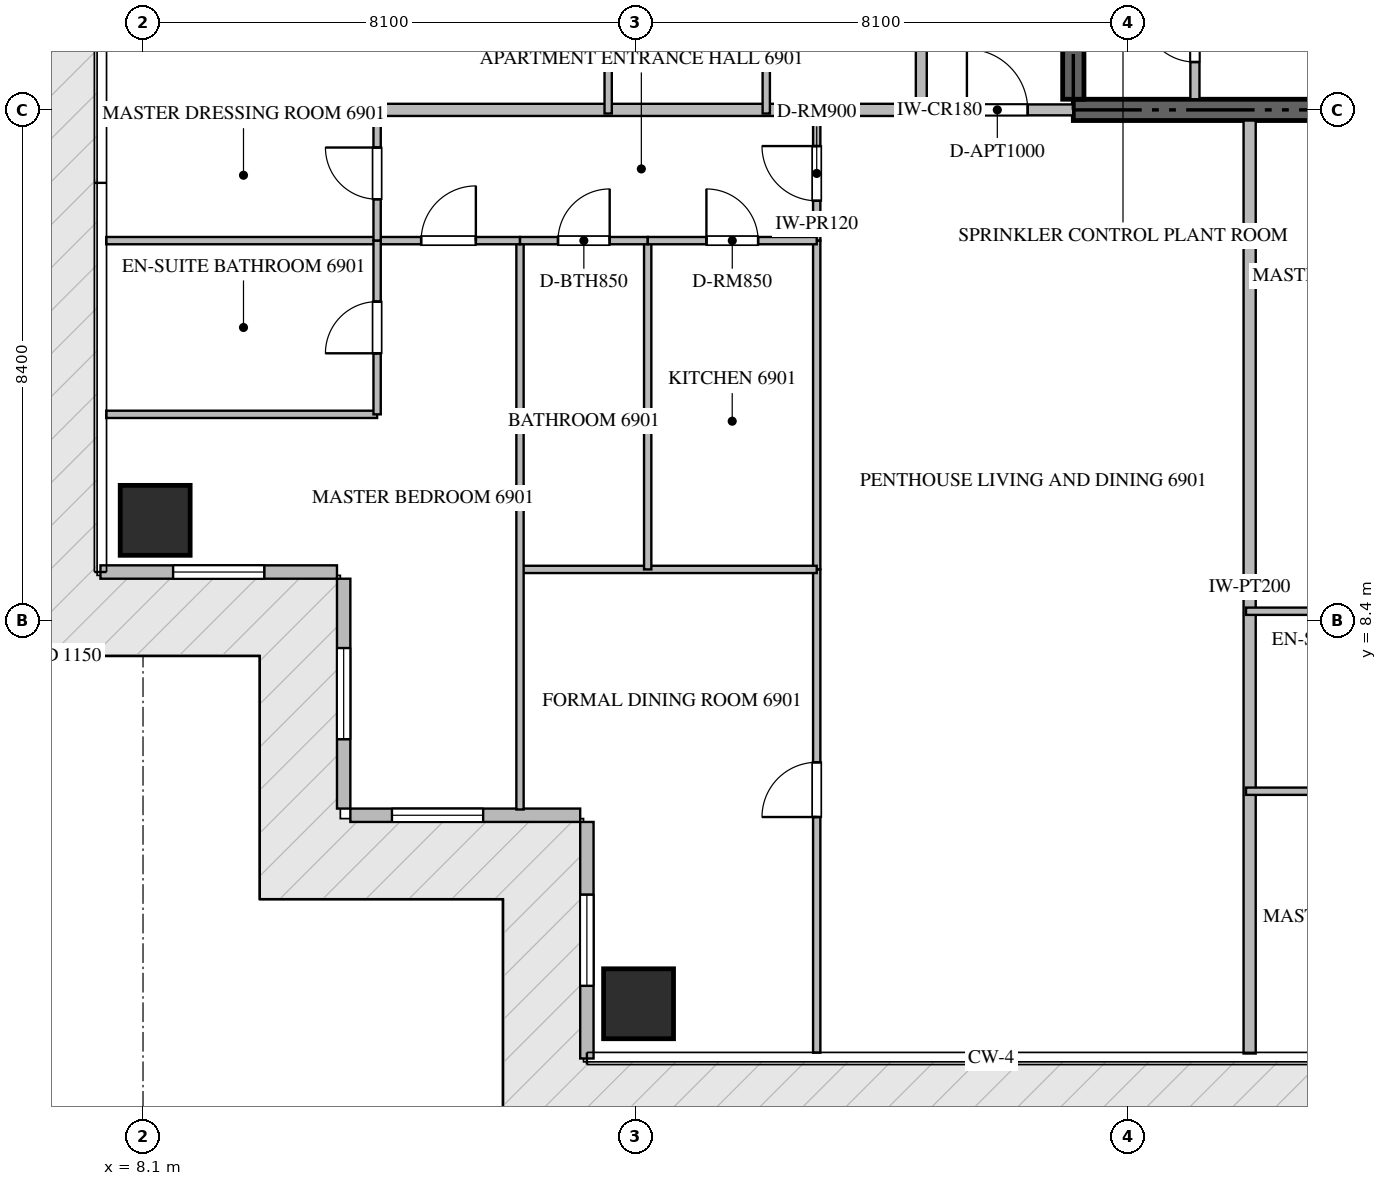
"""IFC4 building model, lengths in metres.
Left out: names, types, materials, properties, quantities, classifications, styles, units other than length and angle.
Written with IfcOpenShell. Run it as: python <this file> out.ifc"""

import sys

from ifc_helpers import new_model, si_unit, direction, frame, frame_2d, origin, origin_2d, place, context, subcontext, project, spatial, rectangle, extrude, source, transform, mapped, element, fill, save


model = new_model("IFC4")
c1 = context("Model", 3, precision=1e-05, world=origin(), true_north=direction((0.0, 1.0)))
c2 = subcontext(c1, "Body", "Model", "MODEL_VIEW")
j1 = project(units=[si_unit("LENGTHUNIT", "METRE"), si_unit("PLANEANGLEUNIT", "RADIAN")], contexts=[c1])
p1 = place(None, origin())
s1 = spatial("IfcSite", under=j1, at=p1, CompositionType="ELEMENT")
p2 = place(p1, origin())
s2 = spatial("IfcBuilding", under=s1, at=p2, CompositionType="ELEMENT")
p3 = place(p2, frame((0.0, 0.0, 275.9)))
s3 = spatial("IfcBuildingStorey", under=s2, at=p3, CompositionType="ELEMENT", Elevation=275.9)
p4 = place(p3, frame((23.4, 16.8, -0.26), z_axis=(0.0, 0.0, 1.0), x_axis=(1.0, 0.0, 0.0)))
e1 = element("IfcWall", 1, at=p4, inside=s3, PredefinedType="SHEAR", context=c2, shape_type="SweptSolid", body=[
    extrude(rectangle(XDim=18.0, YDim=0.35, at=frame_2d((9.0, 0.0))), origin(), (0.0, 0.0, 1.0), 3.848),
])
p5 = place(p3, frame((23.4, 16.975, -0.26), z_axis=(0.0, 0.0, 1.0), x_axis=(0.0, 1.0, 0.0)))
e2 = element("IfcWall", 2, at=p5, inside=s3, PredefinedType="SHEAR", context=c2, shape_type="SweptSolid", body=[
    extrude(rectangle(XDim=4.875, YDim=0.35, at=frame_2d((2.438, 0.0))), origin(), (0.0, 0.0, 1.0), 3.848),
])
m1 = source(origin(), c2, "Body", "SweptSolid", [
    extrude(rectangle(XDim=1.15, YDim=1.15, at=origin_2d()), origin(), (0.0, 0.0, 1.0), 3.85),
])
for number, where, z_axis, x_axis in (
    (3, (16.25, 2.1, -0.26), (0.0, 0.0, 1.0), (1.0, 0.0, 0.0)),
    (4, (8.3, 10.05, -0.26), (0.0, 0.0, 1.0), (1.0, 0.0, 0.0)),
):
    element("IfcColumn", number, at=place(p3, frame(where, z_axis=z_axis, x_axis=x_axis)), inside=s3, PredefinedType="COLUMN", context=c2, shape_type="MappedRepresentation", body=[
        mapped(m1, transform((0.0, 0.0, 0.0), scale=1.0)),
    ])
p6 = place(p3, frame((7.4, 9.2, 0.0), z_axis=(0.0, 0.0, 1.0), x_axis=(1.0, 0.0, 0.0)))
e5 = element("IfcWall", 5, at=p6, inside=s3, PredefinedType="ELEMENTEDWALL", context=c2, shape_type="SweptSolid", body=[
    extrude(rectangle(XDim=3.89, YDim=0.22, at=frame_2d((1.945, 0.0))), origin(), (0.0, 0.0, 1.0), 3.575),
])
p7 = place(p6, frame((1.195, 0.0, 0.65)))
e6 = element("IfcOpeningElement", 6, at=p7, cuts=e5, PredefinedType="OPENING", context=c2, shape_type="SweptSolid", body=[
    extrude(rectangle(XDim=1.5, YDim=2.25, at=frame_2d((0.75, 1.125))), frame((0.0, 0.12, 0.0), z_axis=(0.0, -1.0, 0.0), x_axis=(1.0, 0.0, 0.0)), (0.0, 0.0, 1.0), 0.24),
])
p8 = place(p3, frame((11.4, 9.09, 0.0), z_axis=(0.0, 0.0, 1.0), x_axis=(0.0, -1.0, 0.0)))
e7 = element("IfcWall", 7, at=p8, inside=s3, PredefinedType="ELEMENTEDWALL", context=c2, shape_type="SweptSolid", body=[
    extrude(rectangle(XDim=3.78, YDim=0.22, at=frame_2d((1.89, 0.0))), origin(), (0.0, 0.0, 1.0), 3.575),
])
p9 = place(p8, frame((1.14, 0.0, 0.65)))
e8 = element("IfcOpeningElement", 8, at=p9, cuts=e7, PredefinedType="OPENING", context=c2, shape_type="SweptSolid", body=[
    extrude(rectangle(XDim=1.5, YDim=2.25, at=frame_2d((0.75, 1.125))), frame((0.0, 0.12, 0.0), z_axis=(0.0, -1.0, 0.0), x_axis=(1.0, 0.0, 0.0)), (0.0, 0.0, 1.0), 0.24),
])
p10 = place(p3, frame((11.51, 5.2, 0.0), z_axis=(0.0, 0.0, 1.0), x_axis=(1.0, 0.0, 0.0)))
e9 = element("IfcWall", 9, at=p10, inside=s3, PredefinedType="ELEMENTEDWALL", context=c2, shape_type="SweptSolid", body=[
    extrude(rectangle(XDim=3.78, YDim=0.22, at=frame_2d((1.89, 0.0))), origin(), (0.0, 0.0, 1.0), 3.575),
])
p11 = place(p10, frame((0.684, 0.0, 0.65)))
e10 = element("IfcOpeningElement", 10, at=p11, cuts=e9, PredefinedType="OPENING", context=c2, shape_type="SweptSolid", body=[
    extrude(rectangle(XDim=1.5, YDim=2.25, at=frame_2d((0.75, 1.125))), frame((0.0, 0.12, 0.0), z_axis=(0.0, -1.0, 0.0), x_axis=(1.0, 0.0, 0.0)), (0.0, 0.0, 1.0), 0.24),
])
p12 = place(p3, frame((15.4, 5.09, 0.0), z_axis=(0.0, 0.0, 1.0), x_axis=(0.0, -1.0, 0.0)))
e11 = element("IfcWall", 11, at=p12, inside=s3, PredefinedType="ELEMENTEDWALL", context=c2, shape_type="SweptSolid", body=[
    extrude(rectangle(XDim=3.89, YDim=0.22, at=frame_2d((1.945, 0.0))), origin(), (0.0, 0.0, 1.0), 3.575),
])
p13 = place(p12, frame((1.195, 0.0, 0.65)))
e12 = element("IfcOpeningElement", 12, at=p13, cuts=e11, PredefinedType="OPENING", context=c2, shape_type="SweptSolid", body=[
    extrude(rectangle(XDim=1.5, YDim=2.25, at=frame_2d((0.75, 1.125))), frame((0.0, 0.12, 0.0), z_axis=(0.0, -1.0, 0.0), x_axis=(1.0, 0.0, 0.0)), (0.0, 0.0, 1.0), 0.24),
])
p14 = place(p3, frame((25.4, 16.975, 0.0), z_axis=(0.0, 0.0, 1.0), x_axis=(0.0, 1.0, 0.0)))
e13 = element("IfcWall", 13, at=p14, inside=s3, PredefinedType="PARTITIONING", context=c2, shape_type="SweptSolid", body=[
    extrude(rectangle(XDim=2.075, YDim=0.15, at=frame_2d((1.038, 0.0))), origin(), (0.0, 0.0, 1.0), 3.59),
])
p15 = place(p14, frame((0.612, 0.0, 0.0)))
e14 = element("IfcOpeningElement", 14, at=p15, cuts=e13, PredefinedType="OPENING", context=c2, shape_type="SweptSolid", body=[
    extrude(rectangle(XDim=0.85, YDim=2.1, at=frame_2d((0.425, 1.05))), frame((0.0, 0.085, 0.0), z_axis=(0.0, -1.0, 0.0), x_axis=(1.0, 0.0, 0.0)), (0.0, 0.0, 1.0), 0.17),
])
p16 = place(p3, frame((26.3, 1.282, 0.0), z_axis=(0.0, 0.0, 1.0), x_axis=(0.0, 1.0, 0.0)))
e15 = element("IfcWall", 15, at=p16, inside=s3, PredefinedType="PARTITIONING", context=c2, shape_type="SweptSolid", body=[
    extrude(rectangle(XDim=15.343, YDim=0.2, at=frame_2d((7.671, 0.0))), origin(), (0.0, 0.0, 1.0), 3.59),
])
p17 = place(p3, frame((7.482, 16.8, 0.0), z_axis=(0.0, 0.0, 1.0), x_axis=(1.0, 0.0, 0.0)))
e16 = element("IfcWall", 16, at=p17, inside=s3, PredefinedType="PARTITIONING", context=c2, shape_type="SweptSolid", body=[
    extrude(rectangle(XDim=13.418, YDim=0.2, at=frame_2d((6.709, 0.0))), origin(), (0.0, 0.0, 1.0), 3.59),
])
p18 = place(p3, frame((20.902, 16.8, 0.0), z_axis=(0.0, 0.0, 1.0), x_axis=(1.0, 0.0, 0.0)))
e17 = element("IfcWall", 17, at=p18, inside=s3, PredefinedType="PARTITIONING", context=c2, shape_type="SweptSolid", body=[
    extrude(rectangle(XDim=2.496, YDim=0.18, at=frame_2d((1.248, 0.0))), origin(), (0.0, 0.0, 1.0), 3.59),
])
p19 = place(p18, frame((0.748, 0.0, 0.0)))
e18 = element("IfcOpeningElement", 18, at=p19, cuts=e17, PredefinedType="OPENING", context=c2, shape_type="SweptSolid", body=[
    extrude(rectangle(XDim=1.0, YDim=2.15, at=frame_2d((0.5, 1.075))), frame((0.0, 0.1, 0.0), z_axis=(0.0, -1.0, 0.0), x_axis=(1.0, 0.0, 0.0)), (0.0, 0.0, 1.0), 0.2),
])
p20 = place(p3, frame((20.9, 16.8, 0.0), z_axis=(0.0, 0.0, 1.0), x_axis=(0.0, 1.0, 0.0)))
e19 = element("IfcWall", 19, at=p20, inside=s3, PredefinedType="PARTITIONING", context=c2, shape_type="SweptSolid", body=[
    extrude(rectangle(XDim=16.8, YDim=0.18, at=frame_2d((8.4, 0.0))), origin(), (0.0, 0.0, 1.0), 3.59),
])
p21 = place(p20, frame((4.898, 0.0, 0.0)))
e20 = element("IfcOpeningElement", 20, at=p21, cuts=e19, PredefinedType="OPENING", context=c2, shape_type="SweptSolid", body=[
    extrude(rectangle(XDim=1.0, YDim=2.15, at=frame_2d((0.5, 1.075))), frame((0.0, 0.1, 0.0), z_axis=(0.0, -1.0, 0.0), x_axis=(1.0, 0.0, 0.0)), (0.0, 0.0, 1.0), 0.2),
])
p22 = place(p20, frame((13.335, 0.0, 0.0)))
e21 = element("IfcOpeningElement", 21, at=p22, cuts=e19, PredefinedType="OPENING", context=c2, shape_type="SweptSolid", body=[
    extrude(rectangle(XDim=1.0, YDim=2.15, at=frame_2d((0.5, 1.075))), frame((0.0, 0.1, 0.0), z_axis=(0.0, -1.0, 0.0), x_axis=(1.0, 0.0, 0.0)), (0.0, 0.0, 1.0), 0.2),
])
p23 = place(p3, frame((19.18, 14.65, 0.0), z_axis=(0.0, 0.0, 1.0), x_axis=(0.0, 1.0, 0.0)))
e22 = element("IfcWall", 22, at=p23, inside=s3, PredefinedType="PARTITIONING", context=c2, shape_type="SweptSolid", body=[
    extrude(rectangle(XDim=2.21, YDim=0.12, at=frame_2d((1.105, 0.0))), origin(), (0.0, 0.0, 1.0), 3.59),
])
p24 = place(p23, frame((0.655, 0.0, 0.0)))
e23 = element("IfcOpeningElement", 23, at=p24, cuts=e22, PredefinedType="OPENING", context=c2, shape_type="SweptSolid", body=[
    extrude(rectangle(XDim=0.9, YDim=2.1, at=frame_2d((0.45, 1.05))), frame((0.0, 0.07, 0.0), z_axis=(0.0, -1.0, 0.0), x_axis=(1.0, 0.0, 0.0)), (0.0, 0.0, 1.0), 0.14),
])
p25 = place(p3, frame((19.18, 1.295, 0.0), z_axis=(0.0, 0.0, 1.0), x_axis=(0.0, 1.0, 0.0)))
e24 = element("IfcWall", 24, at=p25, inside=s3, PredefinedType="PARTITIONING", context=c2, shape_type="SweptSolid", body=[
    extrude(rectangle(XDim=7.948, YDim=0.12, at=frame_2d((3.974, 0.0))), origin(), (0.0, 0.0, 1.0), 3.59),
])
p26 = place(p25, frame((3.876, 0.0, 0.0)))
e25 = element("IfcOpeningElement", 25, at=p26, cuts=e24, PredefinedType="OPENING", context=c2, shape_type="SweptSolid", body=[
    extrude(rectangle(XDim=0.9, YDim=2.1, at=frame_2d((0.45, 1.05))), frame((0.0, 0.07, 0.0), z_axis=(0.0, -1.0, 0.0), x_axis=(1.0, 0.0, 0.0)), (0.0, 0.0, 1.0), 0.14),
])
p27 = place(p3, frame((19.18, 9.245, 0.0), z_axis=(0.0, 0.0, 1.0), x_axis=(0.0, 1.0, 0.0)))
e26 = element("IfcWall", 26, at=p27, inside=s3, PredefinedType="PARTITIONING", context=c2, shape_type="SweptSolid", body=[
    extrude(rectangle(XDim=5.403, YDim=0.12, at=frame_2d((2.701, 0.0))), origin(), (0.0, 0.0, 1.0), 3.59),
])
p28 = place(p3, frame((14.3, 9.243, 0.0), z_axis=(0.0, 0.0, 1.0), x_axis=(1.0, 0.0, 0.0)))
e27 = element("IfcWall", 27, at=p28, inside=s3, PredefinedType="PARTITIONING", context=c2, shape_type="SweptSolid", body=[
    extrude(rectangle(XDim=4.88, YDim=0.12, at=frame_2d((2.44, 0.0))), origin(), (0.0, 0.0, 1.0), 3.59),
])
p29 = place(p3, frame((14.3, 5.295, 0.0), z_axis=(0.0, 0.0, 1.0), x_axis=(0.0, 1.0, 0.0)))
e28 = element("IfcWall", 28, at=p29, inside=s3, PredefinedType="PARTITIONING", context=c2, shape_type="SweptSolid", body=[
    extrude(rectangle(XDim=9.355, YDim=0.12, at=frame_2d((4.677, 0.0))), origin(), (0.0, 0.0, 1.0), 3.59),
])
p30 = place(p3, frame((16.4, 9.243, 0.0), z_axis=(0.0, 0.0, 1.0), x_axis=(0.0, 1.0, 0.0)))
e29 = element("IfcWall", 29, at=p30, inside=s3, PredefinedType="PARTITIONING", context=c2, shape_type="SweptSolid", body=[
    extrude(rectangle(XDim=5.407, YDim=0.12, at=frame_2d((2.704, 0.0))), origin(), (0.0, 0.0, 1.0), 3.122),
])
p31 = place(p3, frame((14.3, 14.65, 0.0), z_axis=(0.0, 0.0, 1.0), x_axis=(1.0, 0.0, 0.0)))
e30 = element("IfcWall", 30, at=p31, inside=s3, PredefinedType="PARTITIONING", context=c2, shape_type="SweptSolid", body=[
    extrude(rectangle(XDim=2.1, YDim=0.12, at=frame_2d((1.05, 0.0))), origin(), (0.0, 0.0, 1.0), 3.59),
])
p32 = place(p31, frame((0.625, 0.0, 0.0)))
e31 = element("IfcOpeningElement", 31, at=p32, cuts=e30, PredefinedType="OPENING", context=c2, shape_type="SweptSolid", body=[
    extrude(rectangle(XDim=0.85, YDim=2.1, at=frame_2d((0.425, 1.05))), frame((0.0, 0.07, 0.0), z_axis=(0.0, -1.0, 0.0), x_axis=(1.0, 0.0, 0.0)), (0.0, 0.0, 1.0), 0.14),
])
p33 = place(p3, frame((16.402, 14.65, 0.0), z_axis=(0.0, 0.0, 1.0), x_axis=(1.0, 0.0, 0.0)))
e32 = element("IfcWall", 32, at=p33, inside=s3, PredefinedType="PARTITIONING", context=c2, shape_type="SweptSolid", body=[
    extrude(rectangle(XDim=2.778, YDim=0.12, at=frame_2d((1.389, 0.0))), origin(), (0.0, 0.0, 1.0), 3.59),
])
p34 = place(p33, frame((0.964, 0.0, 0.0)))
e33 = element("IfcOpeningElement", 33, at=p34, cuts=e32, PredefinedType="OPENING", context=c2, shape_type="SweptSolid", body=[
    extrude(rectangle(XDim=0.85, YDim=2.1, at=frame_2d((0.425, 1.05))), frame((0.0, 0.07, 0.0), z_axis=(0.0, -1.0, 0.0), x_axis=(1.0, 0.0, 0.0)), (0.0, 0.0, 1.0), 0.14),
])
p35 = place(p3, frame((11.95, 14.65, 0.0), z_axis=(0.0, 0.0, 1.0), x_axis=(1.0, 0.0, 0.0)))
e34 = element("IfcWall", 34, at=p35, inside=s3, PredefinedType="PARTITIONING", context=c2, shape_type="SweptSolid", body=[
    extrude(rectangle(XDim=2.348, YDim=0.12, at=frame_2d((1.174, 0.0))), origin(), (0.0, 0.0, 1.0), 3.59),
])
p36 = place(p35, frame((0.724, 0.0, 0.0)))
e35 = element("IfcOpeningElement", 35, at=p36, cuts=e34, PredefinedType="OPENING", context=c2, shape_type="SweptSolid", body=[
    extrude(rectangle(XDim=0.9, YDim=2.1, at=frame_2d((0.45, 1.05))), frame((0.0, 0.07, 0.0), z_axis=(0.0, -1.0, 0.0), x_axis=(1.0, 0.0, 0.0)), (0.0, 0.0, 1.0), 0.14),
])
p37 = place(p3, frame((7.495, 11.793, 0.0), z_axis=(0.0, 0.0, 1.0), x_axis=(1.0, 0.0, 0.0)))
e36 = element("IfcWall", 36, at=p37, inside=s3, PredefinedType="PARTITIONING", context=c2, shape_type="SweptSolid", body=[
    extrude(rectangle(XDim=4.455, YDim=0.12, at=frame_2d((2.228, 0.0))), origin(), (0.0, 0.0, 1.0), 3.59),
])
p38 = place(p3, frame((7.495, 14.65, 0.0), z_axis=(0.0, 0.0, 1.0), x_axis=(1.0, 0.0, 0.0)))
e37 = element("IfcWall", 37, at=p38, inside=s3, PredefinedType="PARTITIONING", context=c2, shape_type="SweptSolid", body=[
    extrude(rectangle(XDim=4.453, YDim=0.12, at=frame_2d((2.227, 0.0))), origin(), (0.0, 0.0, 1.0), 3.59),
])
p39 = place(p3, frame((11.95, 11.793, 0.0), z_axis=(0.0, 0.0, 1.0), x_axis=(0.0, 1.0, 0.0)))
e38 = element("IfcWall", 38, at=p39, inside=s3, PredefinedType="PARTITIONING", context=c2, shape_type="SweptSolid", body=[
    extrude(rectangle(XDim=2.857, YDim=0.12, at=frame_2d((1.428, 0.0))), origin(), (0.0, 0.0, 1.0), 3.59),
])
p40 = place(p39, frame((1.004, 0.0, 0.0)))
e39 = element("IfcOpeningElement", 39, at=p40, cuts=e38, PredefinedType="OPENING", context=c2, shape_type="SweptSolid", body=[
    extrude(rectangle(XDim=0.85, YDim=2.1, at=frame_2d((0.425, 1.05))), frame((0.0, 0.07, 0.0), z_axis=(0.0, -1.0, 0.0), x_axis=(1.0, 0.0, 0.0)), (0.0, 0.0, 1.0), 0.14),
])
p41 = place(p3, frame((11.95, 14.652, 0.0), z_axis=(0.0, 0.0, 1.0), x_axis=(0.0, 1.0, 0.0)))
e40 = element("IfcWall", 40, at=p41, inside=s3, PredefinedType="PARTITIONING", context=c2, shape_type="SweptSolid", body=[
    extrude(rectangle(XDim=2.208, YDim=0.12, at=frame_2d((1.104, 0.0))), origin(), (0.0, 0.0, 1.0), 3.59),
])
p42 = place(p41, frame((0.679, 0.0, 0.0)))
e41 = element("IfcOpeningElement", 41, at=p42, cuts=e40, PredefinedType="OPENING", context=c2, shape_type="SweptSolid", body=[
    extrude(rectangle(XDim=0.85, YDim=2.1, at=frame_2d((0.425, 1.05))), frame((0.0, 0.07, 0.0), z_axis=(0.0, -1.0, 0.0), x_axis=(1.0, 0.0, 0.0)), (0.0, 0.0, 1.0), 0.14),
])
for number, where, z_axis, x_axis in (
    (42, (26.24, 5.595, 0.0), (0.0, 0.0, 1.0), (1.0, 0.0, 0.0)),
    (43, (26.24, 8.555, 0.0), (0.0, 0.0, 1.0), (1.0, 0.0, 0.0)),
):
    element("IfcWall", number, at=place(p3, frame(where, z_axis=z_axis, x_axis=x_axis)), inside=s3, PredefinedType="PARTITIONING", context=c2, shape_type="SweptSolid", body=[
        extrude(rectangle(XDim=4.79, YDim=0.12, at=frame_2d((2.395, 0.0))), origin(), (0.0, 0.0, 1.0), 3.59),
    ])
for number, where, z_axis, x_axis in (
    (44, (18.35, 16.74, 0.0), (0.0, 0.0, 1.0), (0.0, 1.0, 0.0)),
    (45, (15.75, 16.74, 0.0), (0.0, 0.0, 1.0), (0.0, 1.0, 0.0)),
):
    element("IfcWall", number, at=place(p3, frame(where, z_axis=z_axis, x_axis=x_axis)), inside=s3, PredefinedType="PARTITIONING", context=c2, shape_type="SweptSolid", body=[
        extrude(rectangle(XDim=2.66, YDim=0.12, at=frame_2d((1.33, 0.0))), origin(), (0.0, 0.0, 1.0), 3.59),
    ])
m2 = source(origin(), c2, "Body", "SweptSolid", [
    extrude(rectangle(XDim=1.5, YDim=2.25, at=frame_2d((0.75, 1.125))), frame((0.0, 0.03, 0.0), z_axis=(0.0, -1.0, 0.0), x_axis=(1.0, 0.0, 0.0)), (0.0, 0.0, 1.0), 0.06),
])
p43 = place(p7, origin())
e46 = element("IfcWindow", 46, at=p43, inside=s3, PartitioningType="SINGLE_PANEL", PredefinedType="WINDOW", context=c2, shape_type="MappedRepresentation", body=[
    mapped(m2, transform((0.0, 0.0, 0.0), scale=1.0)),
])
fill(e6, e46)
p44 = place(p9, origin())
e47 = element("IfcWindow", 47, at=p44, inside=s3, PartitioningType="SINGLE_PANEL", PredefinedType="WINDOW", context=c2, shape_type="MappedRepresentation", body=[
    mapped(m2, transform((0.0, 0.0, 0.0), scale=1.0)),
])
fill(e8, e47)
p45 = place(p11, origin())
e48 = element("IfcWindow", 48, at=p45, inside=s3, PartitioningType="SINGLE_PANEL", PredefinedType="WINDOW", context=c2, shape_type="MappedRepresentation", body=[
    mapped(m2, transform((0.0, 0.0, 0.0), scale=1.0)),
])
fill(e10, e48)
p46 = place(p13, origin())
e49 = element("IfcWindow", 49, at=p46, inside=s3, PartitioningType="SINGLE_PANEL", PredefinedType="WINDOW", context=c2, shape_type="MappedRepresentation", body=[
    mapped(m2, transform((0.0, 0.0, 0.0), scale=1.0)),
])
fill(e12, e49)
m3 = source(origin(), c2, "Body", "SweptSolid", [
    extrude(rectangle(XDim=0.85, YDim=2.1, at=frame_2d((0.425, 1.05))), frame((0.0, 0.025, 0.0), z_axis=(0.0, -1.0, 0.0), x_axis=(1.0, 0.0, 0.0)), (0.0, 0.0, 1.0), 0.05),
])
p47 = place(p15, origin())
e50 = element("IfcDoor", 50, at=p47, inside=s3, OperationType="SINGLE_SWING_RIGHT", PredefinedType="DOOR", context=c2, shape_type="MappedRepresentation", body=[
    mapped(m3, transform((0.0, 0.0, 0.0), scale=1.0)),
])
fill(e14, e50)
m4 = source(origin(), c2, "Body", "SweptSolid", [
    extrude(rectangle(XDim=1.0, YDim=2.15, at=frame_2d((0.5, 1.075))), frame((0.0, 0.025, 0.0), z_axis=(0.0, -1.0, 0.0), x_axis=(1.0, 0.0, 0.0)), (0.0, 0.0, 1.0), 0.05),
])
p48 = place(p19, origin())
e51 = element("IfcDoor", 51, at=p48, inside=s3, OperationType="SINGLE_SWING_LEFT", PredefinedType="DOOR", context=c2, shape_type="MappedRepresentation", body=[
    mapped(m4, transform((0.0, 0.0, 0.0), scale=1.0)),
])
fill(e18, e51)
m5 = source(origin(), c2, "Body", "SweptSolid", [
    extrude(rectangle(XDim=0.9, YDim=2.1, at=frame_2d((0.45, 1.05))), frame((0.0, 0.025, 0.0), z_axis=(0.0, -1.0, 0.0), x_axis=(1.0, 0.0, 0.0)), (0.0, 0.0, 1.0), 0.05),
])
p49 = place(p24, origin())
e52 = element("IfcDoor", 52, at=p49, inside=s3, OperationType="SINGLE_SWING_RIGHT", PredefinedType="DOOR", context=c2, shape_type="MappedRepresentation", body=[
    mapped(m5, transform((0.0, 0.0, 0.0), scale=1.0)),
])
fill(e23, e52)
p50 = place(p26, origin())
e53 = element("IfcDoor", 53, at=p50, inside=s3, OperationType="SINGLE_SWING_LEFT", PredefinedType="DOOR", context=c2, shape_type="MappedRepresentation", body=[
    mapped(m5, transform((0.0, 0.0, 0.0), scale=1.0)),
])
fill(e25, e53)
p51 = place(p32, origin())
e54 = element("IfcDoor", 54, at=p51, inside=s3, OperationType="SINGLE_SWING_RIGHT", PredefinedType="DOOR", context=c2, shape_type="MappedRepresentation", body=[
    mapped(m3, transform((0.0, 0.0, 0.0), scale=1.0)),
])
fill(e31, e54)
p52 = place(p34, origin())
e55 = element("IfcDoor", 55, at=p52, inside=s3, OperationType="SINGLE_SWING_LEFT", PredefinedType="DOOR", context=c2, shape_type="MappedRepresentation", body=[
    mapped(m3, transform((0.0, 0.0, 0.0), scale=1.0)),
])
fill(e33, e55)
p53 = place(p36, origin())
e56 = element("IfcDoor", 56, at=p53, inside=s3, OperationType="SINGLE_SWING_RIGHT", PredefinedType="DOOR", context=c2, shape_type="MappedRepresentation", body=[
    mapped(m5, transform((0.0, 0.0, 0.0), scale=1.0)),
])
fill(e35, e56)
p54 = place(p40, origin())
e57 = element("IfcDoor", 57, at=p54, inside=s3, OperationType="SINGLE_SWING_LEFT", PredefinedType="DOOR", context=c2, shape_type="MappedRepresentation", body=[
    mapped(m3, transform((0.0, 0.0, 0.0), scale=1.0)),
])
fill(e39, e57)
p55 = place(p42, origin())
e58 = element("IfcDoor", 58, at=p55, inside=s3, OperationType="SINGLE_SWING_RIGHT", PredefinedType="DOOR", context=c2, shape_type="MappedRepresentation", body=[
    mapped(m3, transform((0.0, 0.0, 0.0), scale=1.0)),
])
fill(e41, e58)
save(model, sys.argv[1])
